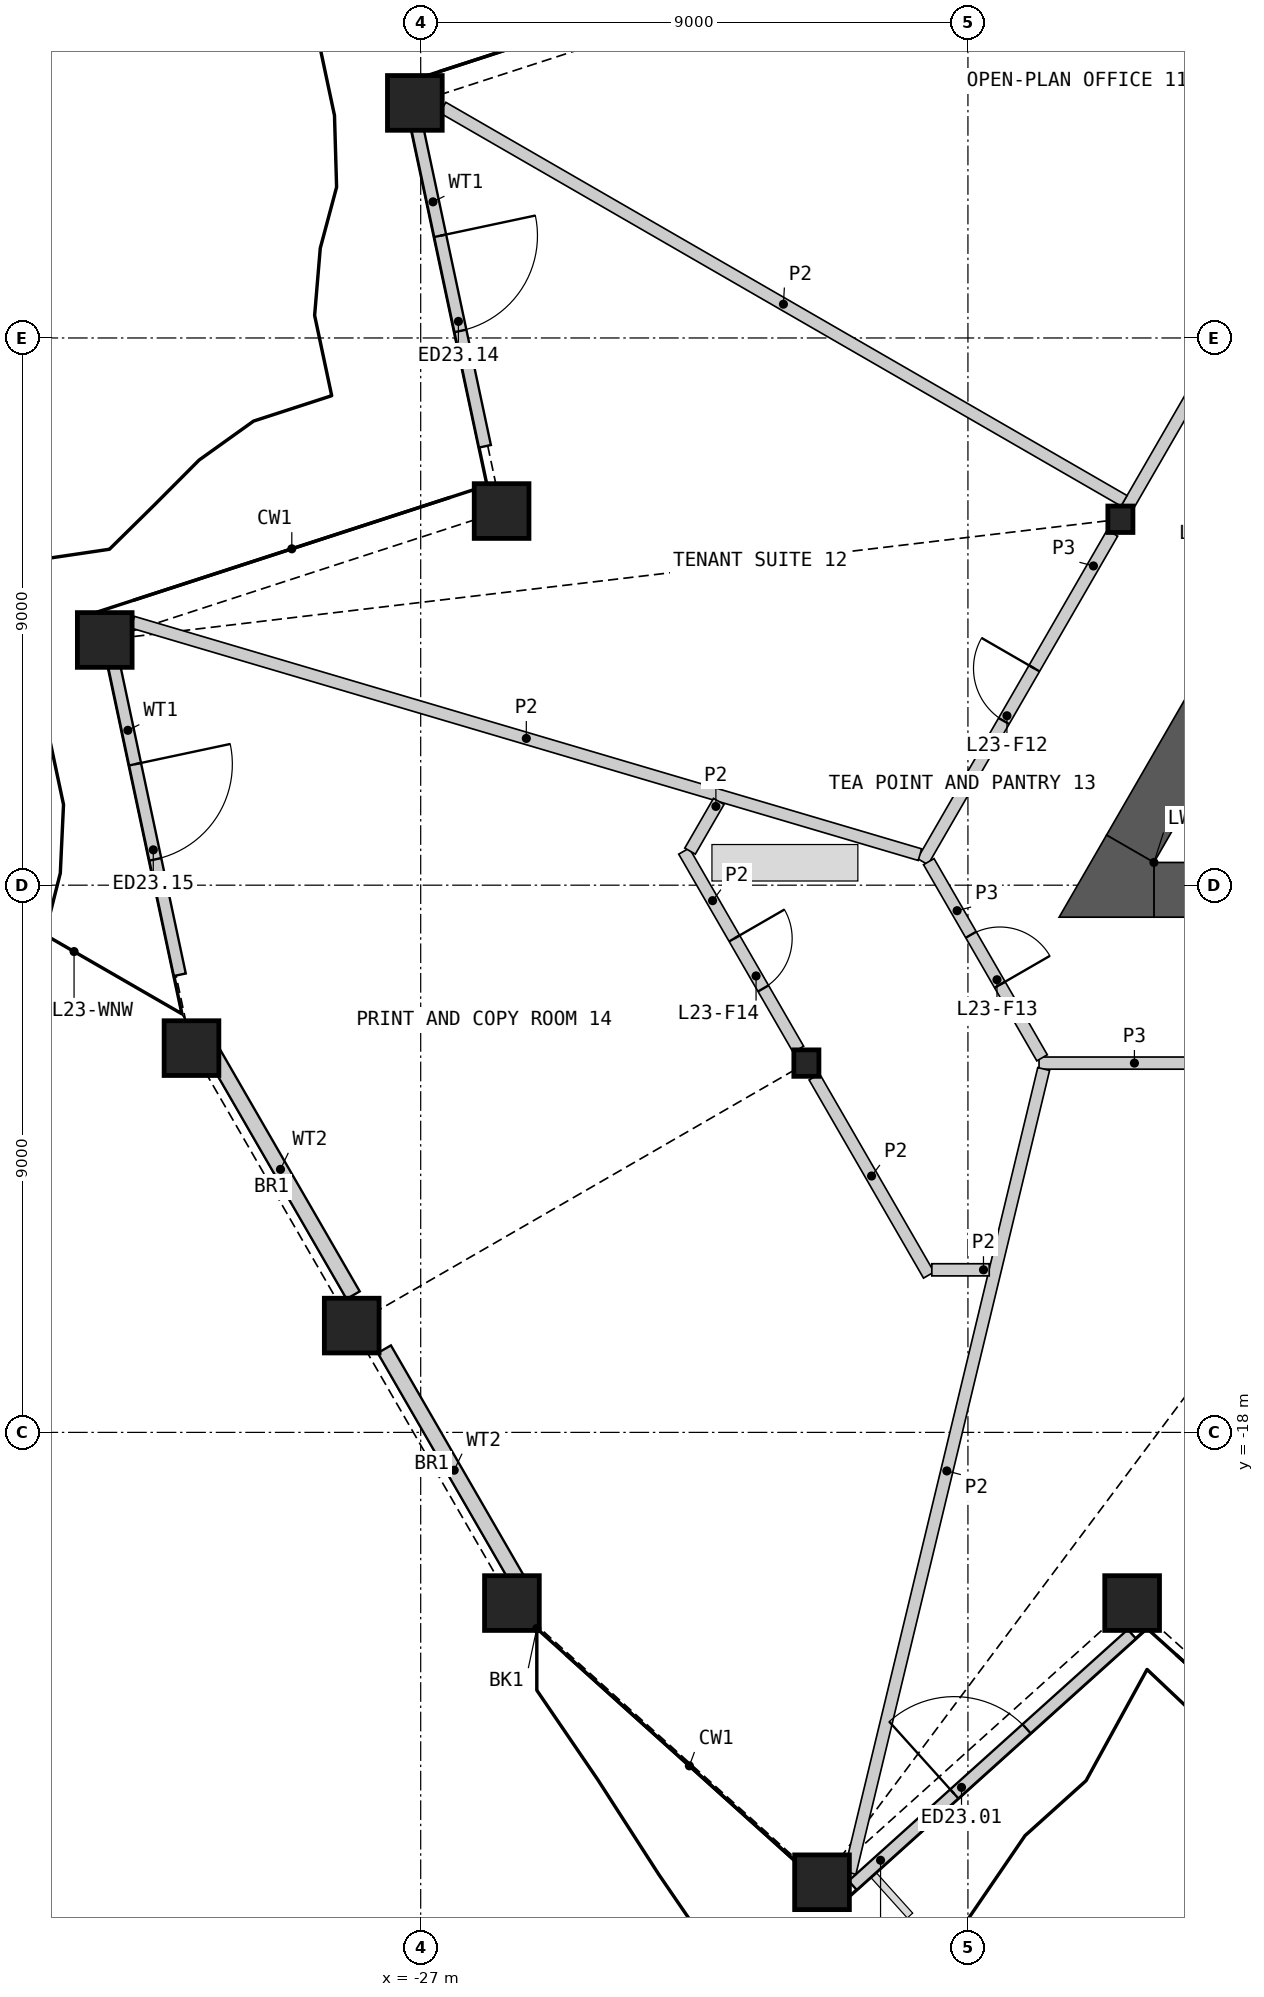
"""IFC4 building model, lengths in metres.
Left out: names, types, materials, properties, quantities, classifications, styles, units other than length and angle.
Written with IfcOpenShell. Run it as: python <this file> out.ifc"""

import sys

from ifc_helpers import new_model, si_unit, direction, frame, frame_2d, origin, origin_2d, place, context, subcontext, project, spatial, polyline, rectangle, hollow_rectangle, i_section, outline, extrude, element, fill, save


model = new_model("IFC4")
c1 = context("Model", 3, precision=1e-05, world=origin(), true_north=direction((0.0, 1.0)))
c2 = subcontext(c1, "Body", "Model", "MODEL_VIEW")
j1 = project(units=[si_unit("LENGTHUNIT", "METRE"), si_unit("PLANEANGLEUNIT", "RADIAN")], contexts=[c1])
p1 = place(None, origin())
s1 = spatial("IfcSite", under=j1, at=p1, CompositionType="ELEMENT")
p2 = place(p1, origin())
s2 = spatial("IfcBuilding", under=s1, at=p2, CompositionType="ELEMENT")
p3 = place(p2, frame((0.0, 0.0, 112.2)))
s3 = spatial("IfcBuildingStorey", under=s2, at=p3, CompositionType="ELEMENT", Elevation=112.2)
for number, where, z_axis, x_axis in (
    (1, (-25.5, -20.807, 0.0), (0.0, 0.0, 1.0), (1.0, 0.0, 0.0)),
    (2, (-20.4, -25.399, 0.0), (0.0, 0.0, 1.0), (1.0, 0.0, 0.0)),
    (3, (-15.3, -20.807, 0.0), (0.0, 0.0, 1.0), (1.0, 0.0, 0.0)),
    (4, (-27.096, 3.866, 0.0), (0.0, 0.0, 1.0), (1.0, 0.0, 0.0)),
    (5, (-25.669, -2.846, 0.0), (0.0, 0.0, 1.0), (1.0, 0.0, 0.0)),
    (6, (-32.196, -4.967, 0.0), (0.0, 0.0, 1.0), (1.0, 0.0, 0.0)),
    (7, (-30.769, -11.68, 0.0), (0.0, 0.0, 1.0), (1.0, 0.0, 0.0)),
    (8, (-28.135, -16.243, 0.0), (0.0, 0.0, 1.0), (1.0, 0.0, 0.0)),
):
    element("IfcColumn", number, at=place(p3, frame(where, z_axis=z_axis, x_axis=x_axis)), inside=s3, PredefinedType="COLUMN", context=c2, shape_type="SweptSolid", body=[
        extrude(hollow_rectangle(XDim=0.9, YDim=0.9, WallThickness=0.06, at=origin_2d()), origin(), (0.0, 0.0, 1.0), 4.2),
    ])
for number, where, z_axis, x_axis in (
    (9, (-15.493, -2.982, 0.0), (0.0, 0.0, 1.0), (1.0, 0.0, 0.0)),
    (10, (-20.657, -11.926, 0.0), (0.0, 0.0, 1.0), (1.0, 0.0, 0.0)),
):
    element("IfcColumn", number, at=place(p3, frame(where, z_axis=z_axis, x_axis=x_axis)), inside=s3, PredefinedType="COLUMN", context=c2, shape_type="SweptSolid", body=[
        extrude(i_section(OverallWidth=0.412, OverallDepth=0.435, WebThickness=0.036, FlangeThickness=0.057, at=origin_2d()), origin(), (0.0, 0.0, 1.0), 4.2),
    ])
p4 = place(p3, frame((-19.896, -25.451, 0.0), z_axis=(0.0, 0.0, 1.0), x_axis=(0.743162487272, 0.669110990428, 0.0)))
e11 = element("IfcWall", 11, at=p4, inside=s3, PredefinedType="SOLIDWALL", context=c2, shape_type="SweptSolid", body=[
    extrude(rectangle(XDim=6.178, YDim=0.2, at=frame_2d((3.089, 0.0))), origin(), (0.0, 0.0, 1.0), 3.189),
])
p5 = place(p4, frame((2.25, 0.0, 0.0)))
e12 = element("IfcOpeningElement", 12, at=p5, cuts=e11, PredefinedType="OPENING", context=c2, shape_type="SweptSolid", body=[
    extrude(rectangle(XDim=1.6, YDim=2.4, at=frame_2d((0.8, 1.2))), frame((0.0, 0.11, 0.0), z_axis=(0.0, -1.0, 0.0), x_axis=(1.0, 0.0, 0.0)), (0.0, 0.0, 1.0), 0.22),
])
p6 = place(p3, frame((-27.083, 3.579, 0.0), z_axis=(0.0, 0.0, 1.0), x_axis=(0.207898180805, -0.978150472278, 0.0)))
e13 = element("IfcWall", 13, at=p6, inside=s3, PredefinedType="SOLIDWALL", context=c2, shape_type="SweptSolid", body=[
    extrude(rectangle(XDim=5.48, YDim=0.2, at=frame_2d((2.74, 0.0))), origin(), (0.0, 0.0, 1.0), 3.189),
])
p7 = place(p6, frame((1.94, 0.0, 0.0)))
e14 = element("IfcOpeningElement", 14, at=p7, cuts=e13, PredefinedType="OPENING", context=c2, shape_type="SweptSolid", body=[
    extrude(rectangle(XDim=1.6, YDim=2.4, at=frame_2d((0.8, 1.2))), frame((0.0, 0.11, 0.0), z_axis=(0.0, -1.0, 0.0), x_axis=(1.0, 0.0, 0.0)), (0.0, 0.0, 1.0), 0.22),
])
p8 = place(p3, frame((-32.101, -5.113, 0.0), z_axis=(0.0, 0.0, 1.0), x_axis=(0.207949862117, -0.978139486395, 0.0)))
e15 = element("IfcWall", 15, at=p8, inside=s3, PredefinedType="SOLIDWALL", context=c2, shape_type="SweptSolid", body=[
    extrude(rectangle(XDim=5.48, YDim=0.2, at=frame_2d((2.74, 0.0))), origin(), (0.0, 0.0, 1.0), 3.189),
])
p9 = place(p8, frame((1.94, 0.0, 0.0)))
e16 = element("IfcOpeningElement", 16, at=p9, cuts=e15, PredefinedType="OPENING", context=c2, shape_type="SweptSolid", body=[
    extrude(rectangle(XDim=1.6, YDim=2.4, at=frame_2d((0.8, 1.2))), frame((0.0, 0.11, 0.0), z_axis=(0.0, -1.0, 0.0), x_axis=(1.0, 0.0, 0.0)), (0.0, 0.0, 1.0), 0.22),
])
p10 = place(p3, frame((-30.5, -11.604, 0.0), z_axis=(0.0, 0.0, 1.0), x_axis=(0.499984810975, -0.866034172995, 0.0)))
e17 = element("IfcWall", 17, at=p10, inside=s3, PredefinedType="SOLIDWALL", context=c2, shape_type="SweptSolid", body=[
    extrude(rectangle(XDim=4.78, YDim=0.25, at=frame_2d((2.39, 0.0))), origin(), (0.0, 0.0, 1.0), 3.189),
])
p11 = place(p3, frame((-27.598, -16.632, 0.0), z_axis=(0.0, 0.0, 1.0), x_axis=(0.500018268964, -0.866014855936, 0.0)))
e18 = element("IfcWall", 18, at=p11, inside=s3, PredefinedType="SOLIDWALL", context=c2, shape_type="SweptSolid", body=[
    extrude(rectangle(XDim=4.596, YDim=0.25, at=frame_2d((2.298, 0.0))), origin(), (0.0, 0.0, 1.0), 3.189),
])
p12 = place(p3, frame((-14.941, -9.076, 0.0), z_axis=(0.0, 0.0, 1.0), x_axis=(1.0, 0.0, 0.0)))
e19 = element("IfcWall", 19, at=p12, inside=s3, PredefinedType="SHEAR", context=c2, shape_type="SweptSolid", body=[
    extrude(rectangle(XDim=7.649, YDim=0.9, at=frame_2d((3.824, 0.0))), origin(), (0.0, 0.0, 1.0), 3.8),
])
p13 = place(p3, frame((-13.271, -4.833, 0.0), z_axis=(0.0, 0.0, 1.0), x_axis=(-0.499994272862, -0.866028710324, 0.0)))
e20 = element("IfcWall", 20, at=p13, inside=s3, PredefinedType="SHEAR", context=c2, shape_type="SweptSolid", body=[
    extrude(rectangle(XDim=4.121, YDim=0.9, at=frame_2d((2.06, 0.0))), origin(), (0.0, 0.0, 1.0), 3.8),
])
p14 = place(p3, origin())
e21 = element("IfcWall", 21, at=p14, inside=s3, PredefinedType="SHEAR", context=c2, shape_type="SweptSolid", body=[
    extrude(outline(polyline([(-14.941, -8.626), (-14.941, -9.526), (-16.5, -9.526), (-15.721, -8.176), (-14.941, -8.626)])), origin(), (0.0, 0.0, 1.0), 3.8),
])
p15 = place(p3, frame((-15.402, -2.823, 0.0), z_axis=(0.0, 0.0, 1.0), x_axis=(0.500023237168, 0.866011987384, 0.0)))
e22 = element("IfcWall", 22, at=p15, inside=s3, PredefinedType="PARTITIONING", context=c2, shape_type="SweptSolid", body=[
    extrude(rectangle(XDim=9.883, YDim=0.2, at=frame_2d((4.942, 0.0))), origin(), (0.0, 0.0, 1.0), 3.8),
])
p16 = place(p15, frame((4.492, 0.0, 0.0)))
e23 = element("IfcOpeningElement", 23, at=p16, cuts=e22, PredefinedType="OPENING", context=c2, shape_type="SweptSolid", body=[
    extrude(rectangle(XDim=1.0, YDim=2.1, at=frame_2d((0.5, 1.05))), frame((0.0, 0.11, 0.0), z_axis=(0.0, -1.0, 0.0), x_axis=(1.0, 0.0, 0.0)), (0.0, 0.0, 1.0), 0.22),
])
p17 = place(p3, frame((-16.831, -11.926, 0.0), z_axis=(0.0, 0.0, 1.0), x_axis=(1.0, 0.0, 0.0)))
e24 = element("IfcWall", 24, at=p17, inside=s3, PredefinedType="PARTITIONING", context=c2, shape_type="SweptSolid", body=[
    extrude(rectangle(XDim=6.275, YDim=0.2, at=frame_2d((3.137, 0.0))), origin(), (0.0, 0.0, 1.0), 3.8),
])
p18 = place(p17, frame((2.688, 0.0, 0.0)))
e25 = element("IfcOpeningElement", 25, at=p18, cuts=e24, PredefinedType="OPENING", context=c2, shape_type="SweptSolid", body=[
    extrude(rectangle(XDim=1.0, YDim=2.1, at=frame_2d((0.5, 1.05))), frame((0.0, 0.11, 0.0), z_axis=(0.0, -1.0, 0.0), x_axis=(1.0, 0.0, 0.0)), (0.0, 0.0, 1.0), 0.22),
])
p19 = place(p3, frame((-18.744, -8.613, 0.0), z_axis=(0.0, 0.0, 1.0), x_axis=(0.499997920671, 0.866026604282, 0.0)))
e26 = element("IfcWall", 26, at=p19, inside=s3, PredefinedType="PARTITIONING", context=c2, shape_type="SweptSolid", body=[
    extrude(rectangle(XDim=6.24, YDim=0.2, at=frame_2d((3.12, 0.0))), origin(), (0.0, 0.0, 1.0), 3.8),
])
p20 = place(p19, frame((2.67, 0.0, 0.0)))
e27 = element("IfcOpeningElement", 27, at=p20, cuts=e26, PredefinedType="OPENING", context=c2, shape_type="SweptSolid", body=[
    extrude(rectangle(XDim=1.0, YDim=2.1, at=frame_2d((0.5, 1.05))), frame((0.0, 0.11, 0.0), z_axis=(0.0, -1.0, 0.0), x_axis=(1.0, 0.0, 0.0)), (0.0, 0.0, 1.0), 0.22),
])
p21 = place(p3, frame((-18.644, -8.613, 0.0), z_axis=(0.0, 0.0, 1.0), x_axis=(0.499958791762, -0.866049194065, 0.0)))
e28 = element("IfcWall", 28, at=p21, inside=s3, PredefinedType="PARTITIONING", context=c2, shape_type="SweptSolid", body=[
    extrude(rectangle(XDim=3.726, YDim=0.2, at=frame_2d((1.863, 0.0))), origin(), (0.0, 0.0, 1.0), 3.8),
])
p22 = place(p21, frame((1.388, 0.0, 0.0)))
e29 = element("IfcOpeningElement", 29, at=p22, cuts=e28, PredefinedType="OPENING", context=c2, shape_type="SweptSolid", body=[
    extrude(rectangle(XDim=0.95, YDim=2.1, at=frame_2d((0.475, 1.05))), frame((0.0, 0.11, 0.0), z_axis=(0.0, -1.0, 0.0), x_axis=(1.0, 0.0, 0.0)), (0.0, 0.0, 1.0), 0.22),
])
p23 = place(p3, frame((-19.94, -25.244, 0.0), z_axis=(0.0, 0.0, 1.0), x_axis=(0.234226353532, 0.972182089586, 0.0)))
e30 = element("IfcWall", 30, at=p23, inside=s3, PredefinedType="PARTITIONING", context=c2, shape_type="SweptSolid", body=[
    extrude(rectangle(XDim=13.599, YDim=0.2, at=frame_2d((6.8, 0.0))), origin(), (0.0, 0.0, 1.0), 2.885),
])
p24 = place(p3, frame((-31.736, -4.675, 0.0), z_axis=(0.0, 0.0, 1.0), x_axis=(0.959053889024, -0.283223653581, 0.0)))
e31 = element("IfcWall", 31, at=p24, inside=s3, PredefinedType="PARTITIONING", context=c2, shape_type="SweptSolid", body=[
    extrude(rectangle(XDim=13.499, YDim=0.2, at=frame_2d((6.75, 0.0))), origin(), (0.0, 0.0, 1.0), 2.885),
])
p25 = place(p3, frame((-26.636, 3.79, 0.0), z_axis=(0.0, 0.0, 1.0), x_axis=(0.866029074283, -0.499993642455, 0.0)))
e32 = element("IfcWall", 32, at=p25, inside=s3, PredefinedType="PARTITIONING", context=c2, shape_type="SweptSolid", body=[
    extrude(rectangle(XDim=12.936, YDim=0.2, at=frame_2d((6.468, 0.0))), origin(), (0.0, 0.0, 1.0), 2.885),
])
p26 = place(p3, frame((-20.526, -12.154, 0.0), z_axis=(0.0, 0.0, 1.0), x_axis=(0.500046282919, -0.86599868068, 0.0)))
e33 = element("IfcWall", 33, at=p26, inside=s3, PredefinedType="PARTITIONING", context=c2, shape_type="SweptSolid", body=[
    extrude(rectangle(XDim=3.763, YDim=0.2, at=frame_2d((1.882, 0.0))), origin(), (0.0, 0.0, 1.0), 2.885),
])
p27 = place(p3, frame((-22.67, -8.44, 0.0), z_axis=(0.0, 0.0, 1.0), x_axis=(0.500018191375, -0.866014900734, 0.0)))
e34 = element("IfcWall", 34, at=p27, inside=s3, PredefinedType="PARTITIONING", context=c2, shape_type="SweptSolid", body=[
    extrude(rectangle(XDim=3.763, YDim=0.2, at=frame_2d((1.882, 0.0))), origin(), (0.0, 0.0, 1.0), 2.885),
])
p28 = place(p27, frame((1.658, 0.0, 0.0)))
e35 = element("IfcOpeningElement", 35, at=p28, cuts=e34, PredefinedType="OPENING", context=c2, shape_type="SweptSolid", body=[
    extrude(rectangle(XDim=0.95, YDim=2.1, at=frame_2d((0.475, 1.05))), frame((0.0, 0.11, 0.0), z_axis=(0.0, -1.0, 0.0), x_axis=(1.0, 0.0, 0.0)), (0.0, 0.0, 1.0), 0.22),
])
for number, where, z_axis, x_axis in (
    (36, (-18.594, -15.326, 0.0), (0.0, 0.0, 1.0), (1.0, 0.0, 0.0)),
    (37, (-22.57, -8.44, 0.0), (0.0, 0.0, 1.0), (0.5, 0.866, 0.0)),
):
    element("IfcWall", number, at=place(p3, frame(where, z_axis=z_axis, x_axis=x_axis)), inside=s3, PredefinedType="PARTITIONING", context=c2, shape_type="SweptSolid", body=[
        extrude(rectangle(XDim=0.944, YDim=0.2, at=frame_2d((0.472, 0.0))), origin(), (0.0, 0.0, 1.0), 2.885),
    ])
p29 = place(p5, origin())
e38 = element("IfcDoor", 38, at=p29, inside=s3, OperationType="DOUBLE_DOOR_SINGLE_SWING", PredefinedType="DOOR", context=c2, shape_type="SweptSolid", body=[
    extrude(rectangle(XDim=1.6, YDim=2.4, at=frame_2d((0.8, 1.2))), frame((0.0, 0.025, 0.0), z_axis=(0.0, -1.0, 0.0), x_axis=(1.0, 0.0, 0.0)), (0.0, 0.0, 1.0), 0.05),
])
fill(e12, e38)
p30 = place(p7, origin())
e39 = element("IfcDoor", 39, at=p30, inside=s3, OperationType="DOUBLE_DOOR_SINGLE_SWING", PredefinedType="DOOR", context=c2, shape_type="SweptSolid", body=[
    extrude(rectangle(XDim=1.6, YDim=2.4, at=frame_2d((0.8, 1.2))), frame((0.0, 0.025, 0.0), z_axis=(0.0, -1.0, 0.0), x_axis=(1.0, 0.0, 0.0)), (0.0, 0.0, 1.0), 0.05),
])
fill(e14, e39)
p31 = place(p9, origin())
e40 = element("IfcDoor", 40, at=p31, inside=s3, OperationType="DOUBLE_DOOR_SINGLE_SWING", PredefinedType="DOOR", context=c2, shape_type="SweptSolid", body=[
    extrude(rectangle(XDim=1.6, YDim=2.4, at=frame_2d((0.8, 1.2))), frame((0.0, 0.025, 0.0), z_axis=(0.0, -1.0, 0.0), x_axis=(1.0, 0.0, 0.0)), (0.0, 0.0, 1.0), 0.05),
])
fill(e16, e40)
p32 = place(p20, origin())
e41 = element("IfcDoor", 41, at=p32, inside=s3, OperationType="SINGLE_SWING_RIGHT", PredefinedType="DOOR", context=c2, shape_type="SweptSolid", body=[
    extrude(rectangle(XDim=1.0, YDim=2.1, at=frame_2d((0.5, 1.05))), frame((0.0, 0.025, 0.0), z_axis=(0.0, -1.0, 0.0), x_axis=(1.0, 0.0, 0.0)), (0.0, 0.0, 1.0), 0.05),
])
fill(e27, e41)
p33 = place(p22, origin())
e42 = element("IfcDoor", 42, at=p33, inside=s3, OperationType="SINGLE_SWING_RIGHT", PredefinedType="DOOR", context=c2, shape_type="SweptSolid", body=[
    extrude(rectangle(XDim=0.95, YDim=2.1, at=frame_2d((0.475, 1.05))), frame((0.0, 0.025, 0.0), z_axis=(0.0, -1.0, 0.0), x_axis=(1.0, 0.0, 0.0)), (0.0, 0.0, 1.0), 0.05),
])
fill(e29, e42)
p34 = place(p28, origin())
e43 = element("IfcDoor", 43, at=p34, inside=s3, OperationType="SINGLE_SWING_LEFT", PredefinedType="DOOR", context=c2, shape_type="SweptSolid", body=[
    extrude(rectangle(XDim=0.95, YDim=2.1, at=frame_2d((0.475, 1.05))), frame((0.0, 0.025, 0.0), z_axis=(0.0, -1.0, 0.0), x_axis=(1.0, 0.0, 0.0)), (0.0, 0.0, 1.0), 0.05),
])
fill(e35, e43)
save(model, sys.argv[1])
